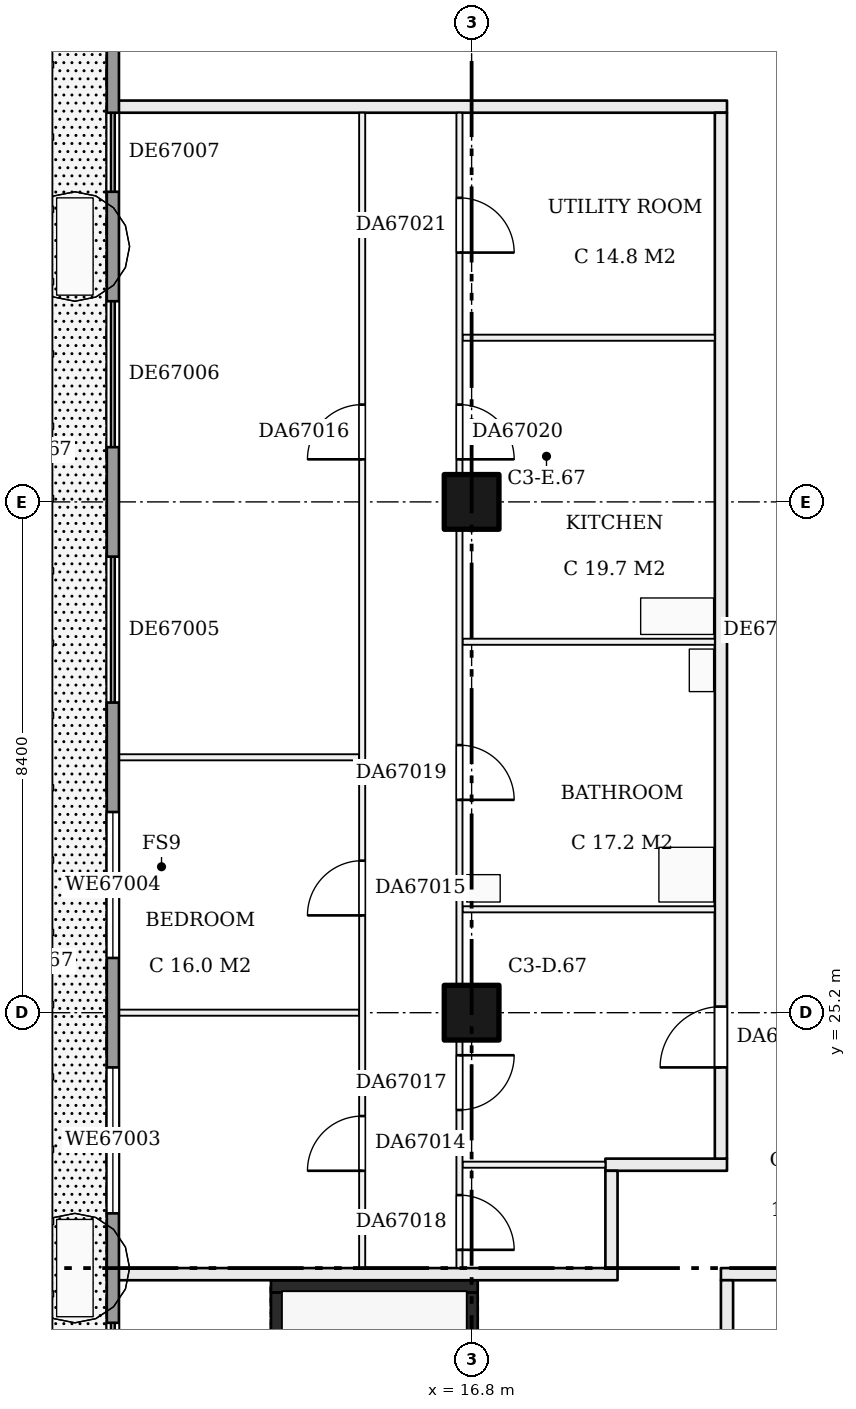
"""IFC4 building model, lengths in metres.
Left out: names, types, materials, properties, quantities, classifications, styles, units other than length and angle.
Written with IfcOpenShell. Run it as: python <this file> out.ifc"""

import sys

from ifc_helpers import new_model, si_unit, direction, frame, frame_2d, origin, origin_2d, place, context, subcontext, project, spatial, rectangle, extrude, element, fill, save


model = new_model("IFC4")
c1 = context("Model", 3, precision=1e-05, world=origin(), true_north=direction((0.0, 1.0)))
c2 = subcontext(c1, "Body", "Model", "MODEL_VIEW")
j1 = project(units=[si_unit("LENGTHUNIT", "METRE"), si_unit("PLANEANGLEUNIT", "RADIAN")], contexts=[c1])
p1 = place(None, origin())
s1 = spatial("IfcSite", under=j1, at=p1, CompositionType="ELEMENT")
p2 = place(p1, origin())
s2 = spatial("IfcBuilding", under=s1, at=p2, CompositionType="ELEMENT")
p3 = place(p2, frame((0.0, 0.0, 256.2)))
s3 = spatial("IfcBuildingStorey", under=s2, at=p3, CompositionType="ELEMENT", Elevation=256.2)
for number, where, z_axis, x_axis in (
    (1, (16.8, 25.2, 0.0), (0.0, 0.0, 1.0), (1.0, 0.0, 0.0)),
    (2, (16.8, 33.6, 0.0), (0.0, 0.0, 1.0), (1.0, 0.0, 0.0)),
):
    element("IfcColumn", number, at=place(p3, frame(where, z_axis=z_axis, x_axis=x_axis)), inside=s3, PredefinedType="COLUMN", context=c2, shape_type="SweptSolid", body=[
        extrude(rectangle(XDim=0.9, YDim=0.9, at=origin_2d()), origin(), (0.0, 0.0, 1.0), 3.22),
    ])
p4 = place(p3, frame((13.6, 13.8, 0.0), z_axis=(0.0, 0.0, 1.0), x_axis=(0.0, 1.0, 0.0)))
e3 = element("IfcWall", 3, at=p4, inside=s3, PredefinedType="SHEAR", context=c2, shape_type="SweptSolid", body=[
    extrude(rectangle(XDim=6.8, YDim=0.2, at=frame_2d((3.4, 0.0))), origin(), (0.0, 0.0, 1.0), 3.22),
])
p5 = place(p3, frame((16.8, 13.8, 0.0), z_axis=(0.0, 0.0, 1.0), x_axis=(0.0, 1.0, 0.0)))
e4 = element("IfcWall", 4, at=p5, inside=s3, PredefinedType="SHEAR", context=c2, shape_type="SweptSolid", body=[
    extrude(rectangle(XDim=6.8, YDim=0.2, at=frame_2d((3.4, 0.0))), origin(), (0.0, 0.0, 1.0), 3.22),
])
p6 = place(p5, frame((0.1, 0.0, 0.0)))
e5 = element("IfcOpeningElement", 5, at=p6, cuts=e4, PredefinedType="OPENING", context=c2, shape_type="SweptSolid", body=[
    extrude(rectangle(XDim=1.0, YDim=2.1, at=frame_2d((0.5, 1.05))), frame((0.0, 0.11, 0.0), z_axis=(0.0, -1.0, 0.0), x_axis=(1.0, 0.0, 0.0)), (0.0, 0.0, 1.0), 0.22),
])
p7 = place(p3, frame((13.5, 20.7, 0.0), z_axis=(0.0, 0.0, 1.0), x_axis=(1.0, 0.0, 0.0)))
e6 = element("IfcWall", 6, at=p7, inside=s3, PredefinedType="SHEAR", context=c2, shape_type="SweptSolid", body=[
    extrude(rectangle(XDim=3.4, YDim=0.2, at=frame_2d((1.7, 0.0))), origin(), (0.0, 0.0, 1.0), 3.22),
])
p8 = place(p3, frame((10.9, 20.9, 0.0), z_axis=(0.0, 0.0, 1.0), x_axis=(1.0, 0.0, 0.0)))
e7 = element("IfcWall", 7, at=p8, inside=s3, PredefinedType="PARTITIONING", context=c2, shape_type="SweptSolid", body=[
    extrude(rectangle(XDim=8.3, YDim=0.2, at=frame_2d((4.15, 0.0))), origin(), (0.0, 0.0, 1.0), 3.22),
])
p9 = place(p3, frame((20.9, 20.9, 0.0), z_axis=(0.0, 0.0, 1.0), x_axis=(1.0, 0.0, 0.0)))
e8 = element("IfcWall", 8, at=p9, inside=s3, PredefinedType="PARTITIONING", context=c2, shape_type="SweptSolid", body=[
    extrude(rectangle(XDim=19.3, YDim=0.2, at=frame_2d((9.65, 0.0))), origin(), (0.0, 0.0, 1.0), 3.22),
])
p10 = place(p9, frame((9.6, 0.0, 0.0)))
e9 = element("IfcOpeningElement", 9, at=p10, cuts=e8, PredefinedType="OPENING", context=c2, shape_type="SweptSolid", body=[
    extrude(rectangle(XDim=1.0, YDim=2.1, at=frame_2d((0.5, 1.05))), frame((0.0, 0.11, 0.0), z_axis=(0.0, -1.0, 0.0), x_axis=(1.0, 0.0, 0.0)), (0.0, 0.0, 1.0), 0.22),
])
p11 = place(p3, frame((16.65, 22.7, 0.0), z_axis=(0.0, 0.0, 1.0), x_axis=(1.0, 0.0, 0.0)))
e10 = element("IfcWall", 10, at=p11, inside=s3, PredefinedType="PARTITIONING", context=c2, shape_type="SweptSolid", body=[
    extrude(rectangle(XDim=2.35, YDim=0.1, at=frame_2d((1.175, 0.0))), origin(), (0.0, 0.0, 1.0), 3.22),
])
p12 = place(p3, frame((19.0, 22.7, 0.0), z_axis=(0.0, 0.0, 1.0), x_axis=(1.0, 0.0, 0.0)))
e11 = element("IfcWall", 11, at=p12, inside=s3, PredefinedType="PARTITIONING", context=c2, shape_type="SweptSolid", body=[
    extrude(rectangle(XDim=2.0, YDim=0.2, at=frame_2d((1.0, 0.0))), origin(), (0.0, 0.0, 1.0), 3.22),
])
p13 = place(p3, frame((10.9, 25.2, 0.0), z_axis=(0.0, 0.0, 1.0), x_axis=(1.0, 0.0, 0.0)))
e12 = element("IfcWall", 12, at=p13, inside=s3, PredefinedType="PARTITIONING", context=c2, shape_type="SweptSolid", body=[
    extrude(rectangle(XDim=4.05, YDim=0.1, at=frame_2d((2.025, 0.0))), origin(), (0.0, 0.0, 1.0), 3.22),
])
p14 = place(p3, frame((16.65, 26.9, 0.0), z_axis=(0.0, 0.0, 1.0), x_axis=(1.0, 0.0, 0.0)))
e13 = element("IfcWall", 13, at=p14, inside=s3, PredefinedType="PARTITIONING", context=c2, shape_type="SweptSolid", body=[
    extrude(rectangle(XDim=4.15, YDim=0.1, at=frame_2d((2.075, 0.0))), origin(), (0.0, 0.0, 1.0), 3.22),
])
p15 = place(p3, frame((10.9, 29.4, 0.0), z_axis=(0.0, 0.0, 1.0), x_axis=(1.0, 0.0, 0.0)))
e14 = element("IfcWall", 14, at=p15, inside=s3, PredefinedType="PARTITIONING", context=c2, shape_type="SweptSolid", body=[
    extrude(rectangle(XDim=4.05, YDim=0.1, at=frame_2d((2.025, 0.0))), origin(), (0.0, 0.0, 1.0), 3.22),
])
for number, where, z_axis, x_axis in (
    (15, (16.65, 31.3, 0.0), (0.0, 0.0, 1.0), (1.0, 0.0, 0.0)),
    (16, (16.65, 36.3, 0.0), (0.0, 0.0, 1.0), (1.0, 0.0, 0.0)),
):
    element("IfcWall", number, at=place(p3, frame(where, z_axis=z_axis, x_axis=x_axis)), inside=s3, PredefinedType="PARTITIONING", context=c2, shape_type="SweptSolid", body=[
        extrude(rectangle(XDim=4.15, YDim=0.1, at=frame_2d((2.075, 0.0))), origin(), (0.0, 0.0, 1.0), 3.22),
    ])
p16 = place(p3, frame((10.9, 40.1, 0.0), z_axis=(0.0, 0.0, 1.0), x_axis=(1.0, 0.0, 0.0)))
e17 = element("IfcWall", 17, at=p16, inside=s3, PredefinedType="PARTITIONING", context=c2, shape_type="SweptSolid", body=[
    extrude(rectangle(XDim=10.1, YDim=0.2, at=frame_2d((5.05, 0.0))), origin(), (0.0, 0.0, 1.0), 3.22),
])
p17 = place(p3, frame((15.0, 21.0, 0.0), z_axis=(0.0, 0.0, 1.0), x_axis=(0.0, 1.0, 0.0)))
e18 = element("IfcWall", 18, at=p17, inside=s3, PredefinedType="PARTITIONING", context=c2, shape_type="SweptSolid", body=[
    extrude(rectangle(XDim=19.0, YDim=0.1, at=frame_2d((9.5, 0.0))), origin(), (0.0, 0.0, 1.0), 3.22),
])
p18 = place(p17, frame((1.6, 0.0, 0.0)))
e19 = element("IfcOpeningElement", 19, at=p18, cuts=e18, PredefinedType="OPENING", context=c2, shape_type="SweptSolid", body=[
    extrude(rectangle(XDim=0.9, YDim=2.1, at=frame_2d((0.45, 1.05))), frame((0.0, 0.06, 0.0), z_axis=(0.0, -1.0, 0.0), x_axis=(1.0, 0.0, 0.0)), (0.0, 0.0, 1.0), 0.12),
])
p19 = place(p17, frame((5.8, 0.0, 0.0)))
e20 = element("IfcOpeningElement", 20, at=p19, cuts=e18, PredefinedType="OPENING", context=c2, shape_type="SweptSolid", body=[
    extrude(rectangle(XDim=0.9, YDim=2.1, at=frame_2d((0.45, 1.05))), frame((0.0, 0.06, 0.0), z_axis=(0.0, -1.0, 0.0), x_axis=(1.0, 0.0, 0.0)), (0.0, 0.0, 1.0), 0.12),
])
p20 = place(p17, frame((13.3, 0.0, 0.0)))
e21 = element("IfcOpeningElement", 21, at=p20, cuts=e18, PredefinedType="OPENING", context=c2, shape_type="SweptSolid", body=[
    extrude(rectangle(XDim=0.9, YDim=2.1, at=frame_2d((0.45, 1.05))), frame((0.0, 0.06, 0.0), z_axis=(0.0, -1.0, 0.0), x_axis=(1.0, 0.0, 0.0)), (0.0, 0.0, 1.0), 0.12),
])
p21 = place(p3, frame((16.6, 21.0, 0.0), z_axis=(0.0, 0.0, 1.0), x_axis=(0.0, 1.0, 0.0)))
e22 = element("IfcWall", 22, at=p21, inside=s3, PredefinedType="PARTITIONING", context=c2, shape_type="SweptSolid", body=[
    extrude(rectangle(XDim=19.0, YDim=0.1, at=frame_2d((9.5, 0.0))), origin(), (0.0, 0.0, 1.0), 3.22),
])
p22 = place(p21, frame((2.6, 0.0, 0.0)))
e23 = element("IfcOpeningElement", 23, at=p22, cuts=e22, PredefinedType="OPENING", context=c2, shape_type="SweptSolid", body=[
    extrude(rectangle(XDim=0.9, YDim=2.1, at=frame_2d((0.45, 1.05))), frame((0.0, 0.06, 0.0), z_axis=(0.0, -1.0, 0.0), x_axis=(1.0, 0.0, 0.0)), (0.0, 0.0, 1.0), 0.12),
])
p23 = place(p21, frame((0.3, 0.0, 0.0)))
e24 = element("IfcOpeningElement", 24, at=p23, cuts=e22, PredefinedType="OPENING", context=c2, shape_type="SweptSolid", body=[
    extrude(rectangle(XDim=0.9, YDim=2.1, at=frame_2d((0.45, 1.05))), frame((0.0, 0.06, 0.0), z_axis=(0.0, -1.0, 0.0), x_axis=(1.0, 0.0, 0.0)), (0.0, 0.0, 1.0), 0.12),
])
p24 = place(p21, frame((7.7, 0.0, 0.0)))
e25 = element("IfcOpeningElement", 25, at=p24, cuts=e22, PredefinedType="OPENING", context=c2, shape_type="SweptSolid", body=[
    extrude(rectangle(XDim=0.9, YDim=2.1, at=frame_2d((0.45, 1.05))), frame((0.0, 0.06, 0.0), z_axis=(0.0, -1.0, 0.0), x_axis=(1.0, 0.0, 0.0)), (0.0, 0.0, 1.0), 0.12),
])
p25 = place(p21, frame((13.3, 0.0, 0.0)))
e26 = element("IfcOpeningElement", 26, at=p25, cuts=e22, PredefinedType="OPENING", context=c2, shape_type="SweptSolid", body=[
    extrude(rectangle(XDim=0.9, YDim=2.1, at=frame_2d((0.45, 1.05))), frame((0.0, 0.06, 0.0), z_axis=(0.0, -1.0, 0.0), x_axis=(1.0, 0.0, 0.0)), (0.0, 0.0, 1.0), 0.12),
])
p26 = place(p21, frame((16.7, 0.0, 0.0)))
e27 = element("IfcOpeningElement", 27, at=p26, cuts=e22, PredefinedType="OPENING", context=c2, shape_type="SweptSolid", body=[
    extrude(rectangle(XDim=0.9, YDim=2.1, at=frame_2d((0.45, 1.05))), frame((0.0, 0.06, 0.0), z_axis=(0.0, -1.0, 0.0), x_axis=(1.0, 0.0, 0.0)), (0.0, 0.0, 1.0), 0.12),
])
p27 = place(p3, frame((19.1, 21.0, 0.0), z_axis=(0.0, 0.0, 1.0), x_axis=(0.0, 1.0, 0.0)))
e28 = element("IfcWall", 28, at=p27, inside=s3, PredefinedType="PARTITIONING", context=c2, shape_type="SweptSolid", body=[
    extrude(rectangle(XDim=1.6, YDim=0.2, at=frame_2d((0.8, 0.0))), origin(), (0.0, 0.0, 1.0), 3.22),
])
p28 = place(p3, frame((20.9, 22.8, 0.0), z_axis=(0.0, 0.0, 1.0), x_axis=(0.0, 1.0, 0.0)))
e29 = element("IfcWall", 29, at=p28, inside=s3, PredefinedType="PARTITIONING", context=c2, shape_type="SweptSolid", body=[
    extrude(rectangle(XDim=17.2, YDim=0.2, at=frame_2d((8.6, 0.0))), origin(), (0.0, 0.0, 1.0), 3.22),
])
p29 = place(p28, frame((1.5, 0.0, 0.0)))
e30 = element("IfcOpeningElement", 30, at=p29, cuts=e29, PredefinedType="OPENING", context=c2, shape_type="SweptSolid", body=[
    extrude(rectangle(XDim=1.0, YDim=2.1, at=frame_2d((0.5, 1.05))), frame((0.0, 0.11, 0.0), z_axis=(0.0, -1.0, 0.0), x_axis=(1.0, 0.0, 0.0)), (0.0, 0.0, 1.0), 0.22),
])
p30 = place(p3, frame((21.0, 13.7, 0.0), z_axis=(0.0, 0.0, 1.0), x_axis=(0.0, 1.0, 0.0)))
e31 = element("IfcWall", 31, at=p30, inside=s3, PredefinedType="PARTITIONING", context=c2, shape_type="SweptSolid", body=[
    extrude(rectangle(XDim=7.1, YDim=0.2, at=frame_2d((3.55, 0.0))), origin(), (0.0, 0.0, 1.0), 3.22),
])
p31 = place(p30, frame((4.5, 0.0, 0.0)))
e32 = element("IfcOpeningElement", 32, at=p31, cuts=e31, PredefinedType="OPENING", context=c2, shape_type="SweptSolid", body=[
    extrude(rectangle(XDim=1.0, YDim=2.1, at=frame_2d((0.5, 1.05))), frame((0.0, 0.11, 0.0), z_axis=(0.0, -1.0, 0.0), x_axis=(1.0, 0.0, 0.0)), (0.0, 0.0, 1.0), 0.22),
])
p32 = place(p3, frame((10.9, 42.0, 0.0), z_axis=(0.0, 0.0, 1.0), x_axis=(0.0, -1.0, 0.0)))
e33 = element("IfcWall", 33, at=p32, inside=s3, PredefinedType="SOLIDWALL", context=c2, shape_type="SweptSolid", body=[
    extrude(rectangle(XDim=28.6, YDim=0.2, at=frame_2d((14.3, 0.0))), origin(), (0.0, 0.0, 1.0), 3.22),
])
p33 = place(p32, frame((25.9, 0.0, 0.0)))
e34 = element("IfcOpeningElement", 34, at=p33, cuts=e33, PredefinedType="OPENING", context=c2, shape_type="SweptSolid", body=[
    extrude(rectangle(XDim=2.4, YDim=2.2, at=frame_2d((1.2, 1.1))), frame((0.0, 0.11, 0.0), z_axis=(0.0, -1.0, 0.0), x_axis=(1.0, 0.0, 0.0)), (0.0, 0.0, 1.0), 0.22),
])
p34 = place(p32, frame((21.9, 0.0, 0.0)))
e35 = element("IfcOpeningElement", 35, at=p34, cuts=e33, PredefinedType="OPENING", context=c2, shape_type="SweptSolid", body=[
    extrude(rectangle(XDim=2.4, YDim=2.2, at=frame_2d((1.2, 1.1))), frame((0.0, 0.11, 0.0), z_axis=(0.0, -1.0, 0.0), x_axis=(1.0, 0.0, 0.0)), (0.0, 0.0, 1.0), 0.22),
])
p35 = place(p32, frame((17.7, 0.0, 0.9)))
e36 = element("IfcOpeningElement", 36, at=p35, cuts=e33, PredefinedType="OPENING", context=c2, shape_type="SweptSolid", body=[
    extrude(rectangle(XDim=2.4, YDim=1.5, at=frame_2d((1.2, 0.75))), frame((0.0, 0.11, 0.0), z_axis=(0.0, -1.0, 0.0), x_axis=(1.0, 0.0, 0.0)), (0.0, 0.0, 1.0), 0.22),
])
p36 = place(p32, frame((13.5, 0.0, 0.9)))
e37 = element("IfcOpeningElement", 37, at=p36, cuts=e33, PredefinedType="OPENING", context=c2, shape_type="SweptSolid", body=[
    extrude(rectangle(XDim=2.4, YDim=1.5, at=frame_2d((1.2, 0.75))), frame((0.0, 0.11, 0.0), z_axis=(0.0, -1.0, 0.0), x_axis=(1.0, 0.0, 0.0)), (0.0, 0.0, 1.0), 0.22),
])
p37 = place(p32, frame((9.3, 0.0, 0.0)))
e38 = element("IfcOpeningElement", 38, at=p37, cuts=e33, PredefinedType="OPENING", context=c2, shape_type="SweptSolid", body=[
    extrude(rectangle(XDim=2.4, YDim=2.2, at=frame_2d((1.2, 1.1))), frame((0.0, 0.11, 0.0), z_axis=(0.0, -1.0, 0.0), x_axis=(1.0, 0.0, 0.0)), (0.0, 0.0, 1.0), 0.22),
])
p38 = place(p32, frame((5.1, 0.0, 0.0)))
e39 = element("IfcOpeningElement", 39, at=p38, cuts=e33, PredefinedType="OPENING", context=c2, shape_type="SweptSolid", body=[
    extrude(rectangle(XDim=2.4, YDim=2.2, at=frame_2d((1.2, 1.1))), frame((0.0, 0.11, 0.0), z_axis=(0.0, -1.0, 0.0), x_axis=(1.0, 0.0, 0.0)), (0.0, 0.0, 1.0), 0.22),
])
p39 = place(p32, frame((2.0, 0.0, 0.0)))
e40 = element("IfcOpeningElement", 40, at=p39, cuts=e33, PredefinedType="OPENING", context=c2, shape_type="SweptSolid", body=[
    extrude(rectangle(XDim=1.3, YDim=2.2, at=frame_2d((0.65, 1.1))), frame((0.0, 0.11, 0.0), z_axis=(0.0, -1.0, 0.0), x_axis=(1.0, 0.0, 0.0)), (0.0, 0.0, 1.0), 0.22),
])
p40 = place(p18, origin())
e41 = element("IfcDoor", 41, at=p40, inside=s3, OperationType="SINGLE_SWING_LEFT", PredefinedType="DOOR", context=c2, shape_type="SweptSolid", body=[
    extrude(rectangle(XDim=0.9, YDim=2.1, at=frame_2d((0.45, 1.05))), frame((0.0, 0.025, 0.0), z_axis=(0.0, -1.0, 0.0), x_axis=(1.0, 0.0, 0.0)), (0.0, 0.0, 1.0), 0.05),
])
fill(e19, e41)
p41 = place(p19, origin())
e42 = element("IfcDoor", 42, at=p41, inside=s3, OperationType="SINGLE_SWING_LEFT", PredefinedType="DOOR", context=c2, shape_type="SweptSolid", body=[
    extrude(rectangle(XDim=0.9, YDim=2.1, at=frame_2d((0.45, 1.05))), frame((0.0, 0.025, 0.0), z_axis=(0.0, -1.0, 0.0), x_axis=(1.0, 0.0, 0.0)), (0.0, 0.0, 1.0), 0.05),
])
fill(e20, e42)
p42 = place(p20, origin())
e43 = element("IfcDoor", 43, at=p42, inside=s3, OperationType="SINGLE_SWING_LEFT", PredefinedType="DOOR", context=c2, shape_type="SweptSolid", body=[
    extrude(rectangle(XDim=0.9, YDim=2.1, at=frame_2d((0.45, 1.05))), frame((0.0, 0.025, 0.0), z_axis=(0.0, -1.0, 0.0), x_axis=(1.0, 0.0, 0.0)), (0.0, 0.0, 1.0), 0.05),
])
fill(e21, e43)
p43 = place(p22, frame((0.9, 0.0, 0.0), z_axis=(0.0, 0.0, 1.0), x_axis=(-1.0, 0.0, 0.0)))
e44 = element("IfcDoor", 44, at=p43, inside=s3, OperationType="SINGLE_SWING_LEFT", PredefinedType="DOOR", context=c2, shape_type="SweptSolid", body=[
    extrude(rectangle(XDim=0.9, YDim=2.1, at=frame_2d((0.45, 1.05))), frame((0.0, 0.025, 0.0), z_axis=(0.0, -1.0, 0.0), x_axis=(1.0, 0.0, 0.0)), (0.0, 0.0, 1.0), 0.05),
])
fill(e23, e44)
p44 = place(p23, frame((0.9, 0.0, 0.0), z_axis=(0.0, 0.0, 1.0), x_axis=(-1.0, 0.0, 0.0)))
e45 = element("IfcDoor", 45, at=p44, inside=s3, OperationType="SINGLE_SWING_RIGHT", PredefinedType="DOOR", context=c2, shape_type="SweptSolid", body=[
    extrude(rectangle(XDim=0.9, YDim=2.1, at=frame_2d((0.45, 1.05))), frame((0.0, 0.025, 0.0), z_axis=(0.0, -1.0, 0.0), x_axis=(1.0, 0.0, 0.0)), (0.0, 0.0, 1.0), 0.05),
])
fill(e24, e45)
p45 = place(p24, frame((0.9, 0.0, 0.0), z_axis=(0.0, 0.0, 1.0), x_axis=(-1.0, 0.0, 0.0)))
e46 = element("IfcDoor", 46, at=p45, inside=s3, OperationType="SINGLE_SWING_RIGHT", PredefinedType="DOOR", context=c2, shape_type="SweptSolid", body=[
    extrude(rectangle(XDim=0.9, YDim=2.1, at=frame_2d((0.45, 1.05))), frame((0.0, 0.025, 0.0), z_axis=(0.0, -1.0, 0.0), x_axis=(1.0, 0.0, 0.0)), (0.0, 0.0, 1.0), 0.05),
])
fill(e25, e46)
p46 = place(p25, frame((0.9, 0.0, 0.0), z_axis=(0.0, 0.0, 1.0), x_axis=(-1.0, 0.0, 0.0)))
e47 = element("IfcDoor", 47, at=p46, inside=s3, OperationType="SINGLE_SWING_RIGHT", PredefinedType="DOOR", context=c2, shape_type="SweptSolid", body=[
    extrude(rectangle(XDim=0.9, YDim=2.1, at=frame_2d((0.45, 1.05))), frame((0.0, 0.025, 0.0), z_axis=(0.0, -1.0, 0.0), x_axis=(1.0, 0.0, 0.0)), (0.0, 0.0, 1.0), 0.05),
])
fill(e26, e47)
p47 = place(p26, frame((0.9, 0.0, 0.0), z_axis=(0.0, 0.0, 1.0), x_axis=(-1.0, 0.0, 0.0)))
e48 = element("IfcDoor", 48, at=p47, inside=s3, OperationType="SINGLE_SWING_RIGHT", PredefinedType="DOOR", context=c2, shape_type="SweptSolid", body=[
    extrude(rectangle(XDim=0.9, YDim=2.1, at=frame_2d((0.45, 1.05))), frame((0.0, 0.025, 0.0), z_axis=(0.0, -1.0, 0.0), x_axis=(1.0, 0.0, 0.0)), (0.0, 0.0, 1.0), 0.05),
])
fill(e27, e48)
p48 = place(p29, origin())
e49 = element("IfcDoor", 49, at=p48, inside=s3, OperationType="SINGLE_SWING_LEFT", PredefinedType="DOOR", context=c2, shape_type="SweptSolid", body=[
    extrude(rectangle(XDim=1.0, YDim=2.1, at=frame_2d((0.5, 1.05))), frame((0.0, 0.025, 0.0), z_axis=(0.0, -1.0, 0.0), x_axis=(1.0, 0.0, 0.0)), (0.0, 0.0, 1.0), 0.05),
])
fill(e30, e49)
p49 = place(p34, origin())
e50 = element("IfcDoor", 50, at=p49, inside=s3, OperationType="DOUBLE_DOOR_SLIDING", PredefinedType="DOOR", context=c2, shape_type="SweptSolid", body=[
    extrude(rectangle(XDim=2.4, YDim=2.2, at=frame_2d((1.2, 1.1))), frame((0.0, 0.025, 0.0), z_axis=(0.0, -1.0, 0.0), x_axis=(1.0, 0.0, 0.0)), (0.0, 0.0, 1.0), 0.05),
])
fill(e35, e50)
p50 = place(p35, origin())
e51 = element("IfcWindow", 51, at=p50, inside=s3, PartitioningType="SINGLE_PANEL", PredefinedType="WINDOW", context=c2, shape_type="SweptSolid", body=[
    extrude(rectangle(XDim=2.4, YDim=1.5, at=frame_2d((1.2, 0.75))), frame((0.0, 0.03, 0.0), z_axis=(0.0, -1.0, 0.0), x_axis=(1.0, 0.0, 0.0)), (0.0, 0.0, 1.0), 0.06),
])
fill(e36, e51)
p51 = place(p36, origin())
e52 = element("IfcWindow", 52, at=p51, inside=s3, PartitioningType="SINGLE_PANEL", PredefinedType="WINDOW", context=c2, shape_type="SweptSolid", body=[
    extrude(rectangle(XDim=2.4, YDim=1.5, at=frame_2d((1.2, 0.75))), frame((0.0, 0.03, 0.0), z_axis=(0.0, -1.0, 0.0), x_axis=(1.0, 0.0, 0.0)), (0.0, 0.0, 1.0), 0.06),
])
fill(e37, e52)
p52 = place(p37, origin())
e53 = element("IfcDoor", 53, at=p52, inside=s3, OperationType="DOUBLE_DOOR_SLIDING", PredefinedType="DOOR", context=c2, shape_type="SweptSolid", body=[
    extrude(rectangle(XDim=2.4, YDim=2.2, at=frame_2d((1.2, 1.1))), frame((0.0, 0.025, 0.0), z_axis=(0.0, -1.0, 0.0), x_axis=(1.0, 0.0, 0.0)), (0.0, 0.0, 1.0), 0.05),
])
fill(e38, e53)
p53 = place(p38, origin())
e54 = element("IfcDoor", 54, at=p53, inside=s3, OperationType="DOUBLE_DOOR_SLIDING", PredefinedType="DOOR", context=c2, shape_type="SweptSolid", body=[
    extrude(rectangle(XDim=2.4, YDim=2.2, at=frame_2d((1.2, 1.1))), frame((0.0, 0.025, 0.0), z_axis=(0.0, -1.0, 0.0), x_axis=(1.0, 0.0, 0.0)), (0.0, 0.0, 1.0), 0.05),
])
fill(e39, e54)
p54 = place(p39, origin())
e55 = element("IfcDoor", 55, at=p54, inside=s3, OperationType="DOUBLE_DOOR_SLIDING", PredefinedType="DOOR", context=c2, shape_type="SweptSolid", body=[
    extrude(rectangle(XDim=1.3, YDim=2.2, at=frame_2d((0.65, 1.1))), frame((0.0, 0.025, 0.0), z_axis=(0.0, -1.0, 0.0), x_axis=(1.0, 0.0, 0.0)), (0.0, 0.0, 1.0), 0.05),
])
fill(e40, e55)
save(model, sys.argv[1])
